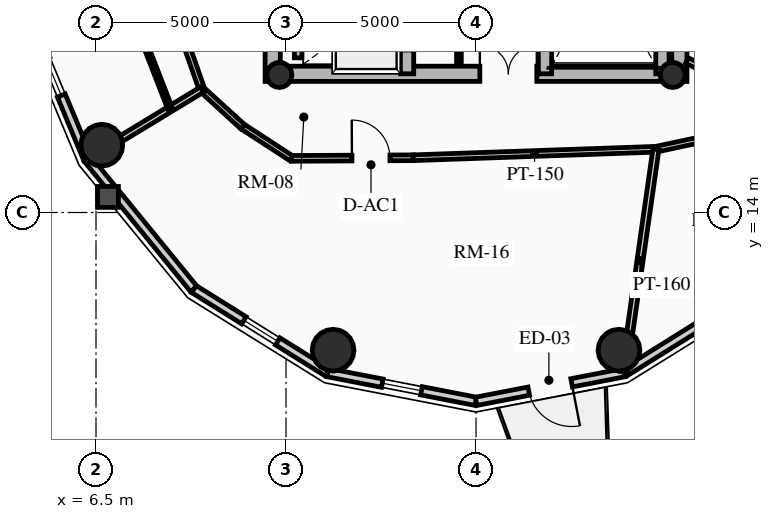
"""IFC4 building model, lengths in metres.
Left out: names, types, materials, properties, quantities, classifications, styles, units other than length and angle.
Written with IfcOpenShell. Run it as: python <this file> out.ifc"""

import sys

from ifc_helpers import new_model, si_unit, direction, frame, frame_2d, origin, origin_2d, place, context, subcontext, project, spatial, rectangle, circle, hollow_circle, extrude, source, transform, mapped, element, fill, save


model = new_model("IFC4")
c1 = context("Model", 3, precision=1e-05, world=origin(), true_north=direction((0.0, 1.0)))
c2 = subcontext(c1, "Body", "Model", "MODEL_VIEW")
j1 = project(units=[si_unit("LENGTHUNIT", "METRE"), si_unit("PLANEANGLEUNIT", "RADIAN")], contexts=[c1])
p1 = place(None, origin())
s1 = spatial("IfcSite", under=j1, at=p1, CompositionType="ELEMENT")
p2 = place(p1, origin())
s2 = spatial("IfcBuilding", under=s1, at=p2, CompositionType="ELEMENT")
p3 = place(p2, frame((0.0, 0.0, 217.03)))
s3 = spatial("IfcBuildingStorey", under=s2, at=p3, CompositionType="ELEMENT", Elevation=217.03)
for number, where, z_axis, x_axis in (
    (1, (11.15, 17.45, 0.0), (0.0, 0.0, 1.0), (0.0, 1.0, 0.0)),
    (2, (21.85, 17.45, 0.0), (0.0, 0.0, 1.0), (0.0, 1.0, 0.0)),
):
    element("IfcWall", number, at=place(p3, frame(where, z_axis=z_axis, x_axis=x_axis)), inside=s3, PredefinedType="SHEAR", context=c2, shape_type="SweptSolid", body=[
        extrude(rectangle(XDim=14.1, YDim=0.4, at=frame_2d((7.05, 0.0))), origin(), (0.0, 0.0, 1.0), 2.91),
    ])
p4 = place(p3, frame((11.15, 17.65, 0.0), z_axis=(0.0, 0.0, 1.0), x_axis=(1.0, 0.0, 0.0)))
e3 = element("IfcWall", 3, at=p4, inside=s3, PredefinedType="SHEAR", context=c2, shape_type="SweptSolid", body=[
    extrude(rectangle(XDim=10.7, YDim=0.4, at=frame_2d((5.35, 0.0))), origin(), (0.0, 0.0, 1.0), 2.91),
])
m1 = source(origin(), c2, "Body", "SweptSolid", [
    extrude(rectangle(XDim=1.5, YDim=2.02, at=frame_2d((0.75, 1.01))), frame((0.0, 0.21, 0.0), z_axis=(0.0, -1.0, 0.0), x_axis=(1.0, 0.0, 0.0)), (0.0, 0.0, 1.0), 0.42),
])
p5 = place(p4, frame((5.45, 0.0, 0.0)))
e4 = element("IfcOpeningElement", 4, at=p5, cuts=e3, PredefinedType="OPENING", context=c2, shape_type="MappedRepresentation", body=[
    mapped(m1, transform((0.0, 0.0, 0.0), x_axis=(1.0, 0.0, 0.0), y_axis=(0.0, 1.0, 0.0), z_axis=(0.0, 0.0, 1.0), scale=1.0)),
])
p6 = place(p3, frame((14.685, 17.65, 0.0), z_axis=(0.0, 0.0, 1.0), x_axis=(0.0, 1.0, 0.0)))
e5 = element("IfcWall", 5, at=p6, inside=s3, PredefinedType="SHEAR", context=c2, shape_type="SweptSolid", body=[
    extrude(rectangle(XDim=13.7, YDim=0.35, at=frame_2d((6.85, 0.0))), origin(), (0.0, 0.0, 1.0), 2.91),
])
m2 = source(origin(), c2, "Body", "SweptSolid", [
    extrude(rectangle(XDim=1.1, YDim=2.015, at=frame_2d((0.55, 1.007))), frame((0.0, 0.185, 0.0), z_axis=(0.0, -1.0, 0.0), x_axis=(1.0, 0.0, 0.0)), (0.0, 0.0, 1.0), 0.37),
])
p7 = place(p6, frame((4.85, 0.0, 0.0)))
e6 = element("IfcOpeningElement", 6, at=p7, cuts=e5, PredefinedType="OPENING", context=c2, shape_type="MappedRepresentation", body=[
    mapped(m2, transform((0.0, 0.0, 0.0), x_axis=(1.0, 0.0, 0.0), y_axis=(0.0, 1.0, 0.0), z_axis=(0.0, 0.0, 1.0), scale=1.0)),
])
p8 = place(p6, frame((0.625, 0.0, 0.0)))
e7 = element("IfcOpeningElement", 7, at=p8, cuts=e5, PredefinedType="OPENING", context=c2, shape_type="MappedRepresentation", body=[
    mapped(m2, transform((0.0, 0.0, 0.0), x_axis=(1.0, 0.0, 0.0), y_axis=(0.0, 1.0, 0.0), z_axis=(0.0, 0.0, 1.0), scale=1.0)),
])
p9 = place(p6, frame((2.625, 0.0, 0.0)))
e8 = element("IfcOpeningElement", 8, at=p9, cuts=e5, PredefinedType="OPENING", context=c2, shape_type="MappedRepresentation", body=[
    mapped(m2, transform((0.0, 0.0, 0.0), x_axis=(1.0, 0.0, 0.0), y_axis=(0.0, 1.0, 0.0), z_axis=(0.0, 0.0, 1.0), scale=1.0)),
])
m3 = source(origin(), c2, "Body", "SweptSolid", [
    extrude(rectangle(XDim=1.15, YDim=2.02, at=frame_2d((0.575, 1.01))), frame((0.0, 0.185, 0.0), z_axis=(0.0, -1.0, 0.0), x_axis=(1.0, 0.0, 0.0)), (0.0, 0.0, 1.0), 0.37),
])
p10 = place(p6, frame((7.27, 0.0, 0.0)))
e9 = element("IfcOpeningElement", 9, at=p10, cuts=e5, PredefinedType="OPENING", context=c2, shape_type="MappedRepresentation", body=[
    mapped(m3, transform((0.0, 0.0, 0.0), x_axis=(1.0, 0.0, 0.0), y_axis=(0.0, 1.0, 0.0), z_axis=(0.0, 0.0, 1.0), scale=1.0)),
])
p11 = place(p3, frame((18.315, 17.65, 0.0), z_axis=(0.0, 0.0, 1.0), x_axis=(0.0, 1.0, 0.0)))
e10 = element("IfcWall", 10, at=p11, inside=s3, PredefinedType="SHEAR", context=c2, shape_type="SweptSolid", body=[
    extrude(rectangle(XDim=9.6, YDim=0.35, at=frame_2d((4.8, 0.0))), origin(), (0.0, 0.0, 1.0), 2.91),
])
p12 = place(p11, frame((5.28, 0.0, 0.0)))
e11 = element("IfcOpeningElement", 11, at=p12, cuts=e10, PredefinedType="OPENING", context=c2, shape_type="MappedRepresentation", body=[
    mapped(m3, transform((0.0, 0.0, 0.0), x_axis=(1.0, 0.0, 0.0), y_axis=(0.0, 1.0, 0.0), z_axis=(0.0, 0.0, 1.0), scale=1.0)),
])
p13 = place(p3, frame((21.405, 17.65, 0.0), z_axis=(0.0, 0.0, 1.0), x_axis=(0.0, 1.0, 0.0)))
e12 = element("IfcWall", 12, at=p13, inside=s3, PredefinedType="SHEAR", context=c2, shape_type="SweptSolid", body=[
    extrude(rectangle(XDim=6.695, YDim=0.35, at=frame_2d((3.348, 0.0))), origin(), (0.0, 0.0, 1.0), 2.91),
])
for number, where, z_axis, x_axis in (
    (13, (11.325, 17.62, 0.0), (0.0, 0.0, 1.0), (1.0, 0.0, 0.0)),
    (14, (21.675, 17.62, 0.0), (0.0, 0.0, 1.0), (1.0, 0.0, 0.0)),
):
    element("IfcColumn", number, at=place(p3, frame(where, z_axis=z_axis, x_axis=x_axis)), inside=s3, PredefinedType="COLUMN", context=c2, shape_type="SweptSolid", body=[
        extrude(hollow_circle(Radius=0.33, WallThickness=0.025, at=origin_2d()), origin(), (0.0, 0.0, 1.0), 2.91),
    ])
for number, where, z_axis, x_axis in (
    (15, (6.653, 15.771, 0.0), (0.0, 0.0, 1.0), (1.0, 0.0, 0.0)),
    (16, (12.739, 10.377, 0.0), (0.0, 0.0, 1.0), (1.0, 0.0, 0.0)),
    (17, (20.261, 10.377, 0.0), (0.0, 0.0, 1.0), (1.0, 0.0, 0.0)),
):
    element("IfcColumn", number, at=place(p3, frame(where, z_axis=z_axis, x_axis=x_axis)), inside=s3, PredefinedType="USERDEFINED", context=c2, shape_type="SweptSolid", body=[
        extrude(circle(Radius=0.55, at=origin_2d()), origin(), (0.0, 0.0, 1.0), 2.91),
    ])
p14 = place(p3, frame((6.282, 15.407, 0.0), z_axis=(0.0, 0.0, 1.0), x_axis=(-0.384036305194, 0.923317993052, 0.0)))
e18 = element("IfcWall", 18, at=p14, inside=s3, PredefinedType="SOLIDWALL", context=c2, shape_type="SweptSolid", body=[
    extrude(rectangle(XDim=4.671, YDim=0.22, at=frame_2d((2.335, 0.0))), origin(), (0.0, 0.0, 1.0), 2.322),
])
m4 = source(origin(), c2, "Body", "SweptSolid", [
    extrude(rectangle(XDim=1.05, YDim=1.3, at=frame_2d((0.525, 0.65))), frame((0.0, 0.12, 0.0), z_axis=(0.0, -1.0, 0.0), x_axis=(1.0, 0.0, 0.0)), (0.0, 0.0, 1.0), 0.24),
])
p15 = place(p14, frame((1.81, 0.0, 0.65)))
e19 = element("IfcOpeningElement", 19, at=p15, cuts=e18, PredefinedType="OPENING", context=c2, shape_type="MappedRepresentation", body=[
    mapped(m4, transform((0.0, 0.0, 0.0), x_axis=(1.0, 0.0, 0.0), y_axis=(0.0, 1.0, 0.0), z_axis=(0.0, 0.0, 1.0), scale=1.0)),
])
p16 = place(p3, frame((9.076, 11.985, 0.0), z_axis=(0.0, 0.0, 1.0), x_axis=(-0.632467166636, 0.774587169483, 0.0)))
e20 = element("IfcWall", 20, at=p16, inside=s3, PredefinedType="SOLIDWALL", context=c2, shape_type="SweptSolid", body=[
    extrude(rectangle(XDim=4.418, YDim=0.22, at=frame_2d((2.209, 0.0))), origin(), (0.0, 0.0, 1.0), 2.322),
])
p17 = place(p3, frame((12.597, 9.787, 0.0), z_axis=(0.0, 0.0, 1.0), x_axis=(-0.848318713376, 0.529485939886, 0.0)))
e21 = element("IfcWall", 21, at=p17, inside=s3, PredefinedType="SOLIDWALL", context=c2, shape_type="SweptSolid", body=[
    extrude(rectangle(XDim=4.15, YDim=0.22, at=frame_2d((2.075, 0.0))), origin(), (0.0, 0.0, 1.0), 2.322),
])
p18 = place(p17, frame((1.55, 0.0, 0.65)))
e22 = element("IfcOpeningElement", 22, at=p18, cuts=e21, PredefinedType="OPENING", context=c2, shape_type="MappedRepresentation", body=[
    mapped(m4, transform((0.0, 0.0, 0.0), x_axis=(1.0, 0.0, 0.0), y_axis=(0.0, 1.0, 0.0), z_axis=(0.0, 0.0, 1.0), scale=1.0)),
])
p19 = place(p3, frame((16.5, 9.03, 0.0), z_axis=(0.0, 0.0, 1.0), x_axis=(-0.981700307484, 0.190432419211, 0.0)))
e23 = element("IfcWall", 23, at=p19, inside=s3, PredefinedType="SOLIDWALL", context=c2, shape_type="SweptSolid", body=[
    extrude(rectangle(XDim=3.976, YDim=0.22, at=frame_2d((1.988, 0.0))), origin(), (0.0, 0.0, 1.0), 2.322),
])
p20 = place(p19, frame((1.463, 0.0, 0.65)))
e24 = element("IfcOpeningElement", 24, at=p20, cuts=e23, PredefinedType="OPENING", context=c2, shape_type="MappedRepresentation", body=[
    mapped(m4, transform((0.0, 0.0, 0.0), x_axis=(1.0, 0.0, 0.0), y_axis=(0.0, 1.0, 0.0), z_axis=(0.0, 0.0, 1.0), scale=1.0)),
])
p21 = place(p3, frame((20.403, 9.787, 0.0), z_axis=(0.0, 0.0, 1.0), x_axis=(-0.981700307484, -0.190432419211, 0.0)))
e25 = element("IfcWall", 25, at=p21, inside=s3, PredefinedType="SOLIDWALL", context=c2, shape_type="SweptSolid", body=[
    extrude(rectangle(XDim=3.976, YDim=0.22, at=frame_2d((1.988, 0.0))), origin(), (0.0, 0.0, 1.0), 2.322),
])
m5 = source(origin(), c2, "Body", "SweptSolid", [
    extrude(rectangle(XDim=1.15, YDim=2.005, at=frame_2d((0.575, 1.002))), frame((0.0, 0.12, 0.0), z_axis=(0.0, -1.0, 0.0), x_axis=(1.0, 0.0, 0.0)), (0.0, 0.0, 1.0), 0.24),
])
p22 = place(p21, frame((1.413, 0.0, 0.0)))
e26 = element("IfcOpeningElement", 26, at=p22, cuts=e25, PredefinedType="OPENING", context=c2, shape_type="MappedRepresentation", body=[
    mapped(m5, transform((0.0, 0.0, 0.0), x_axis=(1.0, 0.0, 0.0), y_axis=(0.0, 1.0, 0.0), z_axis=(0.0, 0.0, 1.0), scale=1.0)),
])
p23 = place(p3, frame((23.924, 11.985, 0.0), z_axis=(0.0, 0.0, 1.0), x_axis=(-0.848318713376, -0.529485939886, 0.0)))
e27 = element("IfcWall", 27, at=p23, inside=s3, PredefinedType="SOLIDWALL", context=c2, shape_type="SweptSolid", body=[
    extrude(rectangle(XDim=4.15, YDim=0.22, at=frame_2d((2.075, 0.0))), origin(), (0.0, 0.0, 1.0), 2.322),
])
p24 = place(p3, frame((11.82, 18.07, 0.0), z_axis=(0.0, 0.0, 1.0), x_axis=(0.0, 1.0, 0.0)))
e28 = element("IfcWall", 28, at=p24, inside=s3, PredefinedType="SHEAR", context=c2, shape_type="SweptSolid", body=[
    extrude(rectangle(XDim=1.635, YDim=0.2, at=frame_2d((0.817, 0.0))), origin(), (0.0, 0.0, 1.0), 2.91),
])
p25 = place(p3, frame((16.05, 17.92, 0.0), z_axis=(0.0, 0.0, 1.0), x_axis=(0.0, 1.0, 0.0)))
e29 = element("IfcWall", 29, at=p25, inside=s3, PredefinedType="PARTITIONING", context=c2, shape_type="SweptSolid", body=[
    extrude(rectangle(XDim=1.8, YDim=0.125, at=frame_2d((0.9, 0.0))), origin(), (0.0, 0.0, 1.0), 2.685),
])
m6 = source(origin(), c2, "Body", "SweptSolid", [
    extrude(rectangle(XDim=0.9, YDim=2.005, at=frame_2d((0.45, 1.002))), frame((0.0, 0.073, 0.0), z_axis=(0.0, -1.0, 0.0), x_axis=(1.0, 0.0, 0.0)), (0.0, 0.0, 1.0), 0.145),
])
p26 = place(p25, frame((0.42, 0.0, 0.0)))
e30 = element("IfcOpeningElement", 30, at=p26, cuts=e29, PredefinedType="OPENING", context=c2, shape_type="MappedRepresentation", body=[
    mapped(m6, transform((0.0, 0.0, 0.0), x_axis=(1.0, 0.0, 0.0), y_axis=(0.0, 1.0, 0.0), z_axis=(0.0, 0.0, 1.0), scale=1.0)),
])
p27 = place(p3, frame((8.832, 18.534, 0.0), z_axis=(0.0, 0.0, 1.0), x_axis=(0.332031819657, -0.943268186008, 0.0)))
e31 = element("IfcWall", 31, at=p27, inside=s3, PredefinedType="PARTITIONING", context=c2, shape_type="SweptSolid", body=[
    extrude(rectangle(XDim=1.377, YDim=0.15, at=frame_2d((0.688, 0.0))), origin(), (0.0, 0.0, 1.0), 2.255),
])
p28 = place(p3, frame((9.289, 17.235, 0.0), z_axis=(0.0, 0.0, 1.0), x_axis=(0.739015164946, -0.673688790155, 0.0)))
e32 = element("IfcWall", 32, at=p28, inside=s3, PredefinedType="PARTITIONING", context=c2, shape_type="SweptSolid", body=[
    extrude(rectangle(XDim=1.446, YDim=0.15, at=frame_2d((0.723, 0.0))), origin(), (0.0, 0.0, 1.0), 2.322),
])
p29 = place(p3, frame((10.358, 16.26, 0.0), z_axis=(0.0, 0.0, 1.0), x_axis=(0.838265397059, -0.545262435983, 0.0)))
e33 = element("IfcWall", 33, at=p29, inside=s3, PredefinedType="PARTITIONING", context=c2, shape_type="SweptSolid", body=[
    extrude(rectangle(XDim=1.534, YDim=0.15, at=frame_2d((0.767, 0.0))), origin(), (0.0, 0.0, 1.0), 2.255),
])
p30 = place(p3, frame((11.644, 15.424, 0.0), z_axis=(0.0, 0.0, 1.0), x_axis=(0.999986552511, 0.005186019339, 0.0)))
e34 = element("IfcWall", 34, at=p30, inside=s3, PredefinedType="PARTITIONING", context=c2, shape_type="SweptSolid", body=[
    extrude(rectangle(XDim=3.201, YDim=0.15, at=frame_2d((1.601, 0.0))), origin(), (0.0, 0.0, 1.0), 2.322),
])
m7 = source(origin(), c2, "Body", "SweptSolid", [
    extrude(rectangle(XDim=1.0, YDim=2.015, at=frame_2d((0.5, 1.007))), frame((0.0, 0.085, 0.0), z_axis=(0.0, -1.0, 0.0), x_axis=(1.0, 0.0, 0.0)), (0.0, 0.0, 1.0), 0.17),
])
p31 = place(p30, frame((1.591, 0.0, 0.0)))
e35 = element("IfcOpeningElement", 35, at=p31, cuts=e34, PredefinedType="OPENING", context=c2, shape_type="MappedRepresentation", body=[
    mapped(m7, transform((0.0, 0.0, 0.0), x_axis=(1.0, 0.0, 0.0), y_axis=(0.0, 1.0, 0.0), z_axis=(0.0, 0.0, 1.0), scale=1.0)),
])
p32 = place(p3, frame((14.845, 15.441, 0.0), z_axis=(0.0, 0.0, 1.0), x_axis=(0.99938794868, 0.034981824334, 0.0)))
e36 = element("IfcWall", 36, at=p32, inside=s3, PredefinedType="PARTITIONING", context=c2, shape_type="SweptSolid", body=[
    extrude(rectangle(XDim=6.393, YDim=0.15, at=frame_2d((3.196, 0.0))), origin(), (0.0, 0.0, 1.0), 2.255),
])
p33 = place(p3, frame((21.234, 15.664, 0.0), z_axis=(0.0, 0.0, 1.0), x_axis=(0.977931581182, 0.208925399431, 0.0)))
e37 = element("IfcWall", 37, at=p33, inside=s3, PredefinedType="PARTITIONING", context=c2, shape_type="SweptSolid", body=[
    extrude(rectangle(XDim=1.823, YDim=0.15, at=frame_2d((0.912, 0.0))), origin(), (0.0, 0.0, 1.0), 2.255),
])
p34 = place(p3, frame((9.289, 17.235, 0.0), z_axis=(0.0, 0.0, 1.0), x_axis=(-0.854741081983, -0.519054604806, 0.0)))
e38 = element("IfcWall", 38, at=p34, inside=s3, PredefinedType="PARTITIONING", context=c2, shape_type="SweptSolid", body=[
    extrude(rectangle(XDim=3.499, YDim=0.16, at=frame_2d((1.75, 0.0))), origin(), (0.0, 0.0, 1.0), 2.322),
])
p35 = place(p3, frame((21.234, 15.664, 0.0), z_axis=(0.0, 0.0, 1.0), x_axis=(-0.141467563045, -0.989942891588, 0.0)))
e39 = element("IfcWall", 39, at=p35, inside=s3, PredefinedType="PARTITIONING", context=c2, shape_type="SweptSolid", body=[
    extrude(rectangle(XDim=5.918, YDim=0.16, at=frame_2d((2.959, 0.0))), origin(), (0.0, 0.0, 1.0), 2.322),
])
p36 = place(p3, frame((22.05, 18.0, 0.0), z_axis=(0.0, 0.0, 1.0), x_axis=(0.896045848613, -0.443961526692, 0.0)))
e40 = element("IfcWall", 40, at=p36, inside=s3, PredefinedType="PARTITIONING", context=c2, shape_type="SweptSolid", body=[
    extrude(rectangle(XDim=1.924, YDim=0.16, at=frame_2d((0.962, 0.0))), origin(), (0.0, 0.0, 1.0), 2.255),
])
m8 = source(origin(), c2, "Body", "SweptSolid", [
    extrude(rectangle(XDim=1.05, YDim=2.015, at=frame_2d((0.525, 1.007))), frame((0.0, 0.09, 0.0), z_axis=(0.0, -1.0, 0.0), x_axis=(1.0, 0.0, 0.0)), (0.0, 0.0, 1.0), 0.18),
])
p37 = place(p36, frame((0.674, 0.0, 0.0)))
e41 = element("IfcOpeningElement", 41, at=p37, cuts=e40, PredefinedType="OPENING", context=c2, shape_type="MappedRepresentation", body=[
    mapped(m8, transform((0.0, 0.0, 0.0), x_axis=(1.0, 0.0, 0.0), y_axis=(0.0, 1.0, 0.0), z_axis=(0.0, 0.0, 1.0), scale=1.0)),
])
p38 = place(p3, frame((7.621, 18.868, 0.0), z_axis=(0.0, 0.0, 1.0), x_axis=(0.361712646649, -0.93228963378, 0.0)))
e42 = element("IfcWall", 42, at=p38, inside=s3, PredefinedType="PARTITIONING", context=c2, shape_type="SweptSolid", body=[
    extrude(rectangle(XDim=2.297, YDim=0.125, at=frame_2d((1.148, 0.0))), origin(), (0.0, 0.0, 1.0), 2.255),
])
m9 = source(origin(), c2, "Body", "SweptSolid", [
    extrude(rectangle(XDim=1.05, YDim=1.3, at=frame_2d((0.525, 0.65))), frame((0.0, 0.03, 0.0), z_axis=(0.0, -1.0, 0.0), x_axis=(1.0, 0.0, 0.0)), (0.0, 0.0, 1.0), 0.06),
])
p39 = place(p15, origin())
e43 = element("IfcWindow", 43, at=p39, inside=s3, PartitioningType="SINGLE_PANEL", PredefinedType="WINDOW", context=c2, shape_type="MappedRepresentation", body=[
    mapped(m9, transform((0.0, 0.0, 0.0), x_axis=(1.0, 0.0, 0.0), y_axis=(0.0, 1.0, 0.0), z_axis=(0.0, 0.0, 1.0), scale=1.0)),
])
fill(e19, e43)
p40 = place(p18, origin())
e44 = element("IfcWindow", 44, at=p40, inside=s3, PartitioningType="SINGLE_PANEL", PredefinedType="WINDOW", context=c2, shape_type="MappedRepresentation", body=[
    mapped(m9, transform((0.0, 0.0, 0.0), x_axis=(1.0, 0.0, 0.0), y_axis=(0.0, 1.0, 0.0), z_axis=(0.0, 0.0, 1.0), scale=1.0)),
])
fill(e22, e44)
p41 = place(p20, origin())
e45 = element("IfcWindow", 45, at=p41, inside=s3, PartitioningType="SINGLE_PANEL", PredefinedType="WINDOW", context=c2, shape_type="MappedRepresentation", body=[
    mapped(m9, transform((0.0, 0.0, 0.0), x_axis=(1.0, 0.0, 0.0), y_axis=(0.0, 1.0, 0.0), z_axis=(0.0, 0.0, 1.0), scale=1.0)),
])
fill(e24, e45)
m10 = source(origin(), c2, "Body", "SweptSolid", [
    extrude(rectangle(XDim=1.15, YDim=2.005, at=frame_2d((0.575, 1.002))), frame((0.0, 0.025, 0.0), z_axis=(0.0, -1.0, 0.0), x_axis=(1.0, 0.0, 0.0)), (0.0, 0.0, 1.0), 0.05),
])
p42 = place(p22, origin())
e46 = element("IfcDoor", 46, at=p42, inside=s3, OperationType="SINGLE_SWING_LEFT", PredefinedType="DOOR", context=c2, shape_type="MappedRepresentation", body=[
    mapped(m10, transform((0.0, 0.0, 0.0), x_axis=(1.0, 0.0, 0.0), y_axis=(0.0, 1.0, 0.0), z_axis=(0.0, 0.0, 1.0), scale=1.0)),
])
fill(e26, e46)
m11 = source(origin(), c2, "Body", "SweptSolid", [
    extrude(rectangle(XDim=1.5, YDim=2.02, at=frame_2d((0.75, 1.01))), frame((0.0, 0.025, 0.0), z_axis=(0.0, -1.0, 0.0), x_axis=(1.0, 0.0, 0.0)), (0.0, 0.0, 1.0), 0.05),
])
p43 = place(p5, origin())
e47 = element("IfcDoor", 47, at=p43, inside=s3, OperationType="DOUBLE_DOOR_SINGLE_SWING", PredefinedType="DOOR", context=c2, shape_type="MappedRepresentation", body=[
    mapped(m11, transform((0.0, 0.0, 0.0), x_axis=(1.0, 0.0, 0.0), y_axis=(0.0, 1.0, 0.0), z_axis=(0.0, 0.0, 1.0), scale=1.0)),
])
fill(e4, e47)
m12 = source(origin(), c2, "Body", "SweptSolid", [
    extrude(rectangle(XDim=1.0, YDim=2.015, at=frame_2d((0.5, 1.007))), frame((0.0, 0.025, 0.0), z_axis=(0.0, -1.0, 0.0), x_axis=(1.0, 0.0, 0.0)), (0.0, 0.0, 1.0), 0.05),
])
p44 = place(p31, origin())
e48 = element("IfcDoor", 48, at=p44, inside=s3, OperationType="SINGLE_SWING_LEFT", PredefinedType="DOOR", context=c2, shape_type="MappedRepresentation", body=[
    mapped(m12, transform((0.0, 0.0, 0.0), x_axis=(1.0, 0.0, 0.0), y_axis=(0.0, 1.0, 0.0), z_axis=(0.0, 0.0, 1.0), scale=1.0)),
])
fill(e35, e48)
save(model, sys.argv[1])
